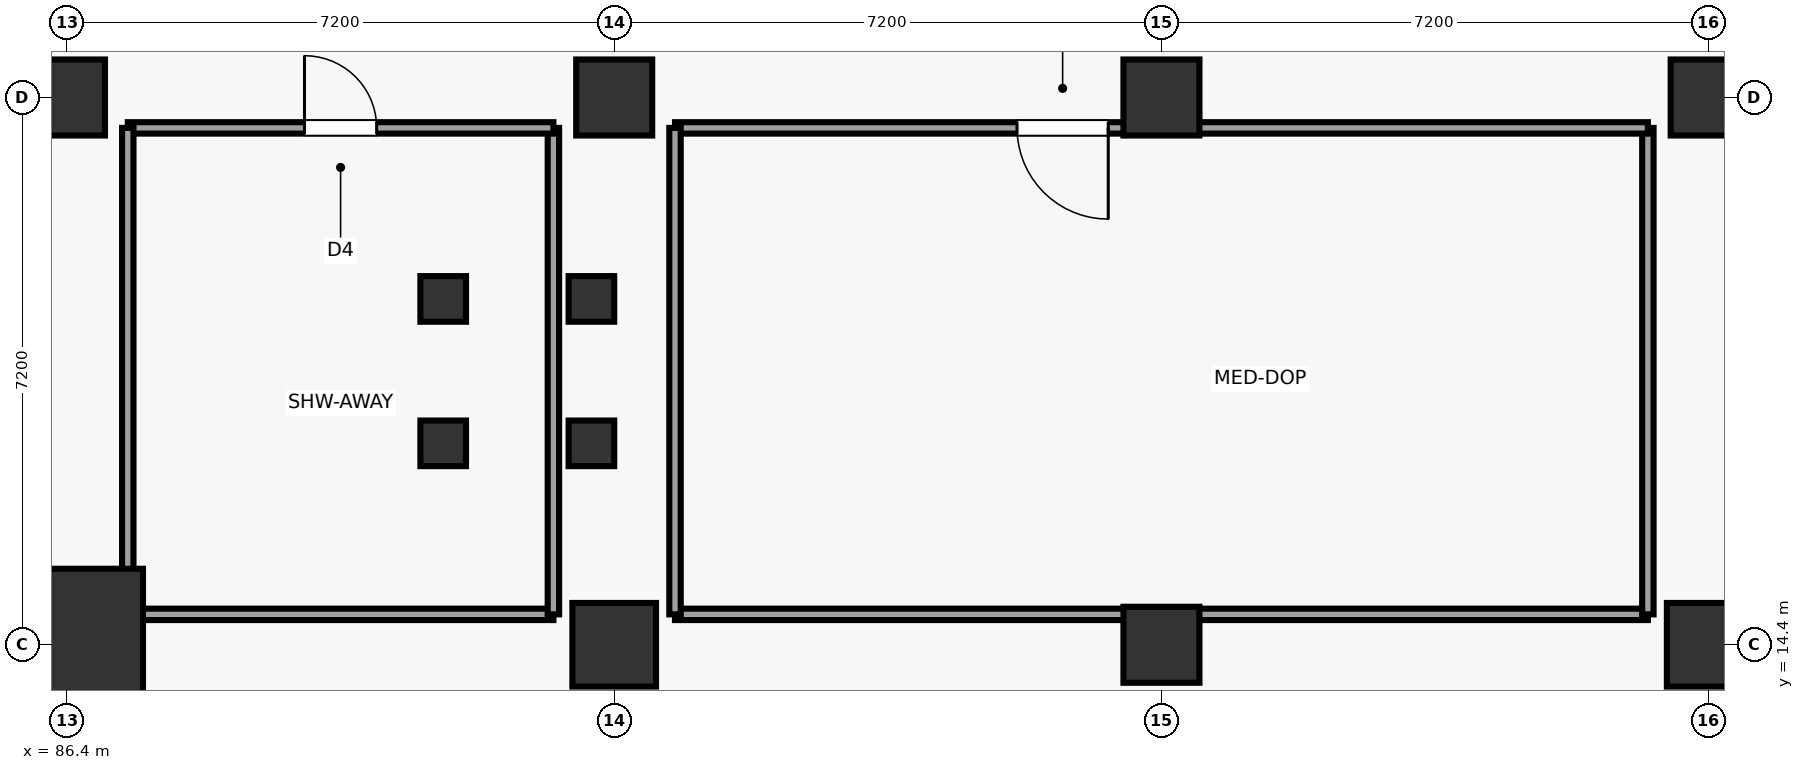
"""IFC4 building model, lengths in metres.
Left out: names, types, materials, properties, quantities, classifications, styles, units other than length and angle.
Written with IfcOpenShell. Run it as: python <this file> out.ifc"""

import sys

from ifc_helpers import new_model, si_unit, direction, frame, frame_2d, origin, origin_2d, place, context, subcontext, project, spatial, rectangle, circle, extrude, element, fill, save


model = new_model("IFC4")
c1 = context("Model", 3, precision=1e-05, world=origin(), true_north=direction((0.0, 1.0)))
c2 = subcontext(c1, "Body", "Model", "MODEL_VIEW")
j1 = project(units=[si_unit("LENGTHUNIT", "METRE"), si_unit("PLANEANGLEUNIT", "RADIAN")], contexts=[c1])
p1 = place(None, origin())
s1 = spatial("IfcSite", under=j1, at=p1, CompositionType="ELEMENT")
p2 = place(p1, origin())
s2 = spatial("IfcBuilding", under=s1, at=p2, CompositionType="ELEMENT")
p3 = place(p2, frame((0.0, 0.0, -5.4)))
s3 = spatial("IfcBuildingStorey", under=s2, at=p3, CompositionType="ELEMENT", Elevation=-5.4)
p4 = place(p3, frame((86.4, 14.4, 0.0), z_axis=(0.0, 0.0, 1.0), x_axis=(1.0, 0.0, 0.0)))
e1 = element("IfcColumn", 1, at=p4, inside=s3, PredefinedType="COLUMN", context=c2, shape_type="SweptSolid", body=[
    extrude(circle(Radius=1.0, at=origin_2d()), origin(), (0.0, 0.0, 1.0), 5.4),
])
p5 = place(p3, frame((86.4, 21.6, 0.0), z_axis=(0.0, 0.0, 1.0), x_axis=(1.0, 0.0, 0.0)))
e2 = element("IfcColumn", 2, at=p5, inside=s3, PredefinedType="COLUMN", context=c2, shape_type="SweptSolid", body=[
    extrude(rectangle(XDim=1.0, YDim=1.0, at=origin_2d()), origin(), (0.0, 0.0, 1.0), 5.4),
])
p6 = place(p3, frame((93.6, 14.4, 0.0), z_axis=(0.0, 0.0, 1.0), x_axis=(1.0, 0.0, 0.0)))
e3 = element("IfcColumn", 3, at=p6, inside=s3, PredefinedType="COLUMN", context=c2, shape_type="SweptSolid", body=[
    extrude(rectangle(XDim=1.1, YDim=1.1, at=origin_2d()), origin(), (0.0, 0.0, 1.0), 5.4),
])
p7 = place(p3, frame((93.6, 21.6, 0.0), z_axis=(0.0, 0.0, 1.0), x_axis=(1.0, 0.0, 0.0)))
e4 = element("IfcColumn", 4, at=p7, inside=s3, PredefinedType="COLUMN", context=c2, shape_type="SweptSolid", body=[
    extrude(rectangle(XDim=1.0, YDim=1.0, at=origin_2d()), origin(), (0.0, 0.0, 1.0), 5.4),
])
p8 = place(p3, frame((100.8, 14.4, 0.0), z_axis=(0.0, 0.0, 1.0), x_axis=(1.0, 0.0, 0.0)))
e5 = element("IfcColumn", 5, at=p8, inside=s3, PredefinedType="COLUMN", context=c2, shape_type="SweptSolid", body=[
    extrude(circle(Radius=0.5, at=origin_2d()), origin(), (0.0, 0.0, 1.0), 5.4),
])
p9 = place(p3, frame((100.8, 21.6, 0.0), z_axis=(0.0, 0.0, 1.0), x_axis=(1.0, 0.0, 0.0)))
e6 = element("IfcColumn", 6, at=p9, inside=s3, PredefinedType="COLUMN", context=c2, shape_type="SweptSolid", body=[
    extrude(rectangle(XDim=1.0, YDim=1.0, at=origin_2d()), origin(), (0.0, 0.0, 1.0), 5.4),
])
p10 = place(p3, frame((108.0, 14.4, 0.0), z_axis=(0.0, 0.0, 1.0), x_axis=(1.0, 0.0, 0.0)))
e7 = element("IfcColumn", 7, at=p10, inside=s3, PredefinedType="COLUMN", context=c2, shape_type="SweptSolid", body=[
    extrude(rectangle(XDim=1.1, YDim=1.1, at=origin_2d()), origin(), (0.0, 0.0, 1.0), 5.4),
])
p11 = place(p3, frame((108.0, 21.6, 0.0), z_axis=(0.0, 0.0, 1.0), x_axis=(1.0, 0.0, 0.0)))
e8 = element("IfcColumn", 8, at=p11, inside=s3, PredefinedType="COLUMN", context=c2, shape_type="SweptSolid", body=[
    extrude(rectangle(XDim=1.0, YDim=1.0, at=origin_2d()), origin(), (0.0, 0.0, 1.0), 5.4),
])
for number, where, z_axis, x_axis in (
    (9, (91.35, 17.05, 0.0), (0.0, 0.0, 1.0), (1.0, 0.0, 0.0)),
    (10, (93.3, 17.05, 0.0), (0.0, 0.0, 1.0), (1.0, 0.0, 0.0)),
    (11, (91.35, 18.95, 0.0), (0.0, 0.0, 1.0), (1.0, 0.0, 0.0)),
    (12, (93.3, 18.95, 0.0), (0.0, 0.0, 1.0), (1.0, 0.0, 0.0)),
):
    element("IfcColumn", number, at=place(p3, frame(where, z_axis=z_axis, x_axis=x_axis)), inside=s3, PredefinedType="COLUMN", context=c2, shape_type="SweptSolid", body=[
        extrude(rectangle(XDim=0.6, YDim=0.6, at=origin_2d()), origin(), (0.0, 0.0, 1.0), 5.4),
    ])
p12 = place(p3, frame((87.2, 14.8, 0.0), z_axis=(0.0, 0.0, 1.0), x_axis=(1.0, 0.0, 0.0)))
e13 = element("IfcWall", 13, at=p12, inside=s3, PredefinedType="PARTITIONING", context=c2, shape_type="SweptSolid", body=[
    extrude(rectangle(XDim=5.6, YDim=0.15, at=frame_2d((2.8, 0.0))), origin(), (0.0, 0.0, 1.0), 4.04),
])
p13 = place(p3, frame((92.8, 14.8, 0.0), z_axis=(0.0, 0.0, 1.0), x_axis=(0.0, 1.0, 0.0)))
e14 = element("IfcWall", 14, at=p13, inside=s3, PredefinedType="PARTITIONING", context=c2, shape_type="SweptSolid", body=[
    extrude(rectangle(XDim=6.4, YDim=0.15, at=frame_2d((3.2, 0.0))), origin(), (0.0, 0.0, 1.0), 4.04),
])
p14 = place(p3, frame((92.8, 21.2, 0.0), z_axis=(0.0, 0.0, 1.0), x_axis=(-1.0, 0.0, 0.0)))
e15 = element("IfcWall", 15, at=p14, inside=s3, PredefinedType="PARTITIONING", context=c2, shape_type="SweptSolid", body=[
    extrude(rectangle(XDim=5.6, YDim=0.15, at=frame_2d((2.8, 0.0))), origin(), (0.0, 0.0, 1.0), 4.04),
])
p15 = place(p14, frame((2.325, 0.0, 0.0)))
e16 = element("IfcOpeningElement", 16, at=p15, cuts=e15, PredefinedType="OPENING", context=c2, shape_type="SweptSolid", body=[
    extrude(rectangle(XDim=0.95, YDim=2.15, at=frame_2d((0.475, 1.075))), frame((0.0, 0.085, 0.0), z_axis=(0.0, -1.0, 0.0), x_axis=(1.0, 0.0, 0.0)), (0.0, 0.0, 1.0), 0.17),
])
p16 = place(p3, frame((87.2, 21.2, 0.0), z_axis=(0.0, 0.0, 1.0), x_axis=(0.0, -1.0, 0.0)))
e17 = element("IfcWall", 17, at=p16, inside=s3, PredefinedType="PARTITIONING", context=c2, shape_type="SweptSolid", body=[
    extrude(rectangle(XDim=6.4, YDim=0.15, at=frame_2d((3.2, 0.0))), origin(), (0.0, 0.0, 1.0), 4.04),
])
p17 = place(p3, frame((94.4, 14.8, 0.0), z_axis=(0.0, 0.0, 1.0), x_axis=(1.0, 0.0, 0.0)))
e18 = element("IfcWall", 18, at=p17, inside=s3, PredefinedType="PARTITIONING", context=c2, shape_type="SweptSolid", body=[
    extrude(rectangle(XDim=12.8, YDim=0.15, at=frame_2d((6.4, 0.0))), origin(), (0.0, 0.0, 1.0), 4.04),
])
p18 = place(p3, frame((107.2, 14.8, 0.0), z_axis=(0.0, 0.0, 1.0), x_axis=(0.0, 1.0, 0.0)))
e19 = element("IfcWall", 19, at=p18, inside=s3, PredefinedType="PARTITIONING", context=c2, shape_type="SweptSolid", body=[
    extrude(rectangle(XDim=6.4, YDim=0.15, at=frame_2d((3.2, 0.0))), origin(), (0.0, 0.0, 1.0), 4.04),
])
p19 = place(p3, frame((107.2, 21.2, 0.0), z_axis=(0.0, 0.0, 1.0), x_axis=(-1.0, 0.0, 0.0)))
e20 = element("IfcWall", 20, at=p19, inside=s3, PredefinedType="PARTITIONING", context=c2, shape_type="SweptSolid", body=[
    extrude(rectangle(XDim=12.8, YDim=0.15, at=frame_2d((6.4, 0.0))), origin(), (0.0, 0.0, 1.0), 4.04),
])
p20 = place(p19, frame((7.1, 0.0, 0.0)))
e21 = element("IfcOpeningElement", 21, at=p20, cuts=e20, PredefinedType="OPENING", context=c2, shape_type="SweptSolid", body=[
    extrude(rectangle(XDim=1.2, YDim=2.2, at=frame_2d((0.6, 1.1))), frame((0.0, 0.085, 0.0), z_axis=(0.0, -1.0, 0.0), x_axis=(1.0, 0.0, 0.0)), (0.0, 0.0, 1.0), 0.17),
])
p21 = place(p3, frame((94.4, 21.2, 0.0), z_axis=(0.0, 0.0, 1.0), x_axis=(0.0, -1.0, 0.0)))
e22 = element("IfcWall", 22, at=p21, inside=s3, PredefinedType="PARTITIONING", context=c2, shape_type="SweptSolid", body=[
    extrude(rectangle(XDim=6.4, YDim=0.15, at=frame_2d((3.2, 0.0))), origin(), (0.0, 0.0, 1.0), 4.04),
])
p22 = place(p15, frame((0.95, 0.0, 0.0), z_axis=(0.0, 0.0, 1.0), x_axis=(-1.0, 0.0, 0.0)))
e23 = element("IfcDoor", 23, at=p22, inside=s3, OperationType="SINGLE_SWING_RIGHT", PredefinedType="DOOR", context=c2, shape_type="SweptSolid", body=[
    extrude(rectangle(XDim=0.95, YDim=2.15, at=frame_2d((0.475, 1.075))), frame((0.0, 0.025, 0.0), z_axis=(0.0, -1.0, 0.0), x_axis=(1.0, 0.0, 0.0)), (0.0, 0.0, 1.0), 0.05),
])
fill(e16, e23)
p23 = place(p20, origin())
e24 = element("IfcDoor", 24, at=p23, inside=s3, OperationType="SINGLE_SWING_LEFT", PredefinedType="DOOR", context=c2, shape_type="SweptSolid", body=[
    extrude(rectangle(XDim=1.2, YDim=2.2, at=frame_2d((0.6, 1.1))), frame((0.0, 0.025, 0.0), z_axis=(0.0, -1.0, 0.0), x_axis=(1.0, 0.0, 0.0)), (0.0, 0.0, 1.0), 0.05),
])
fill(e21, e24)
save(model, sys.argv[1])
